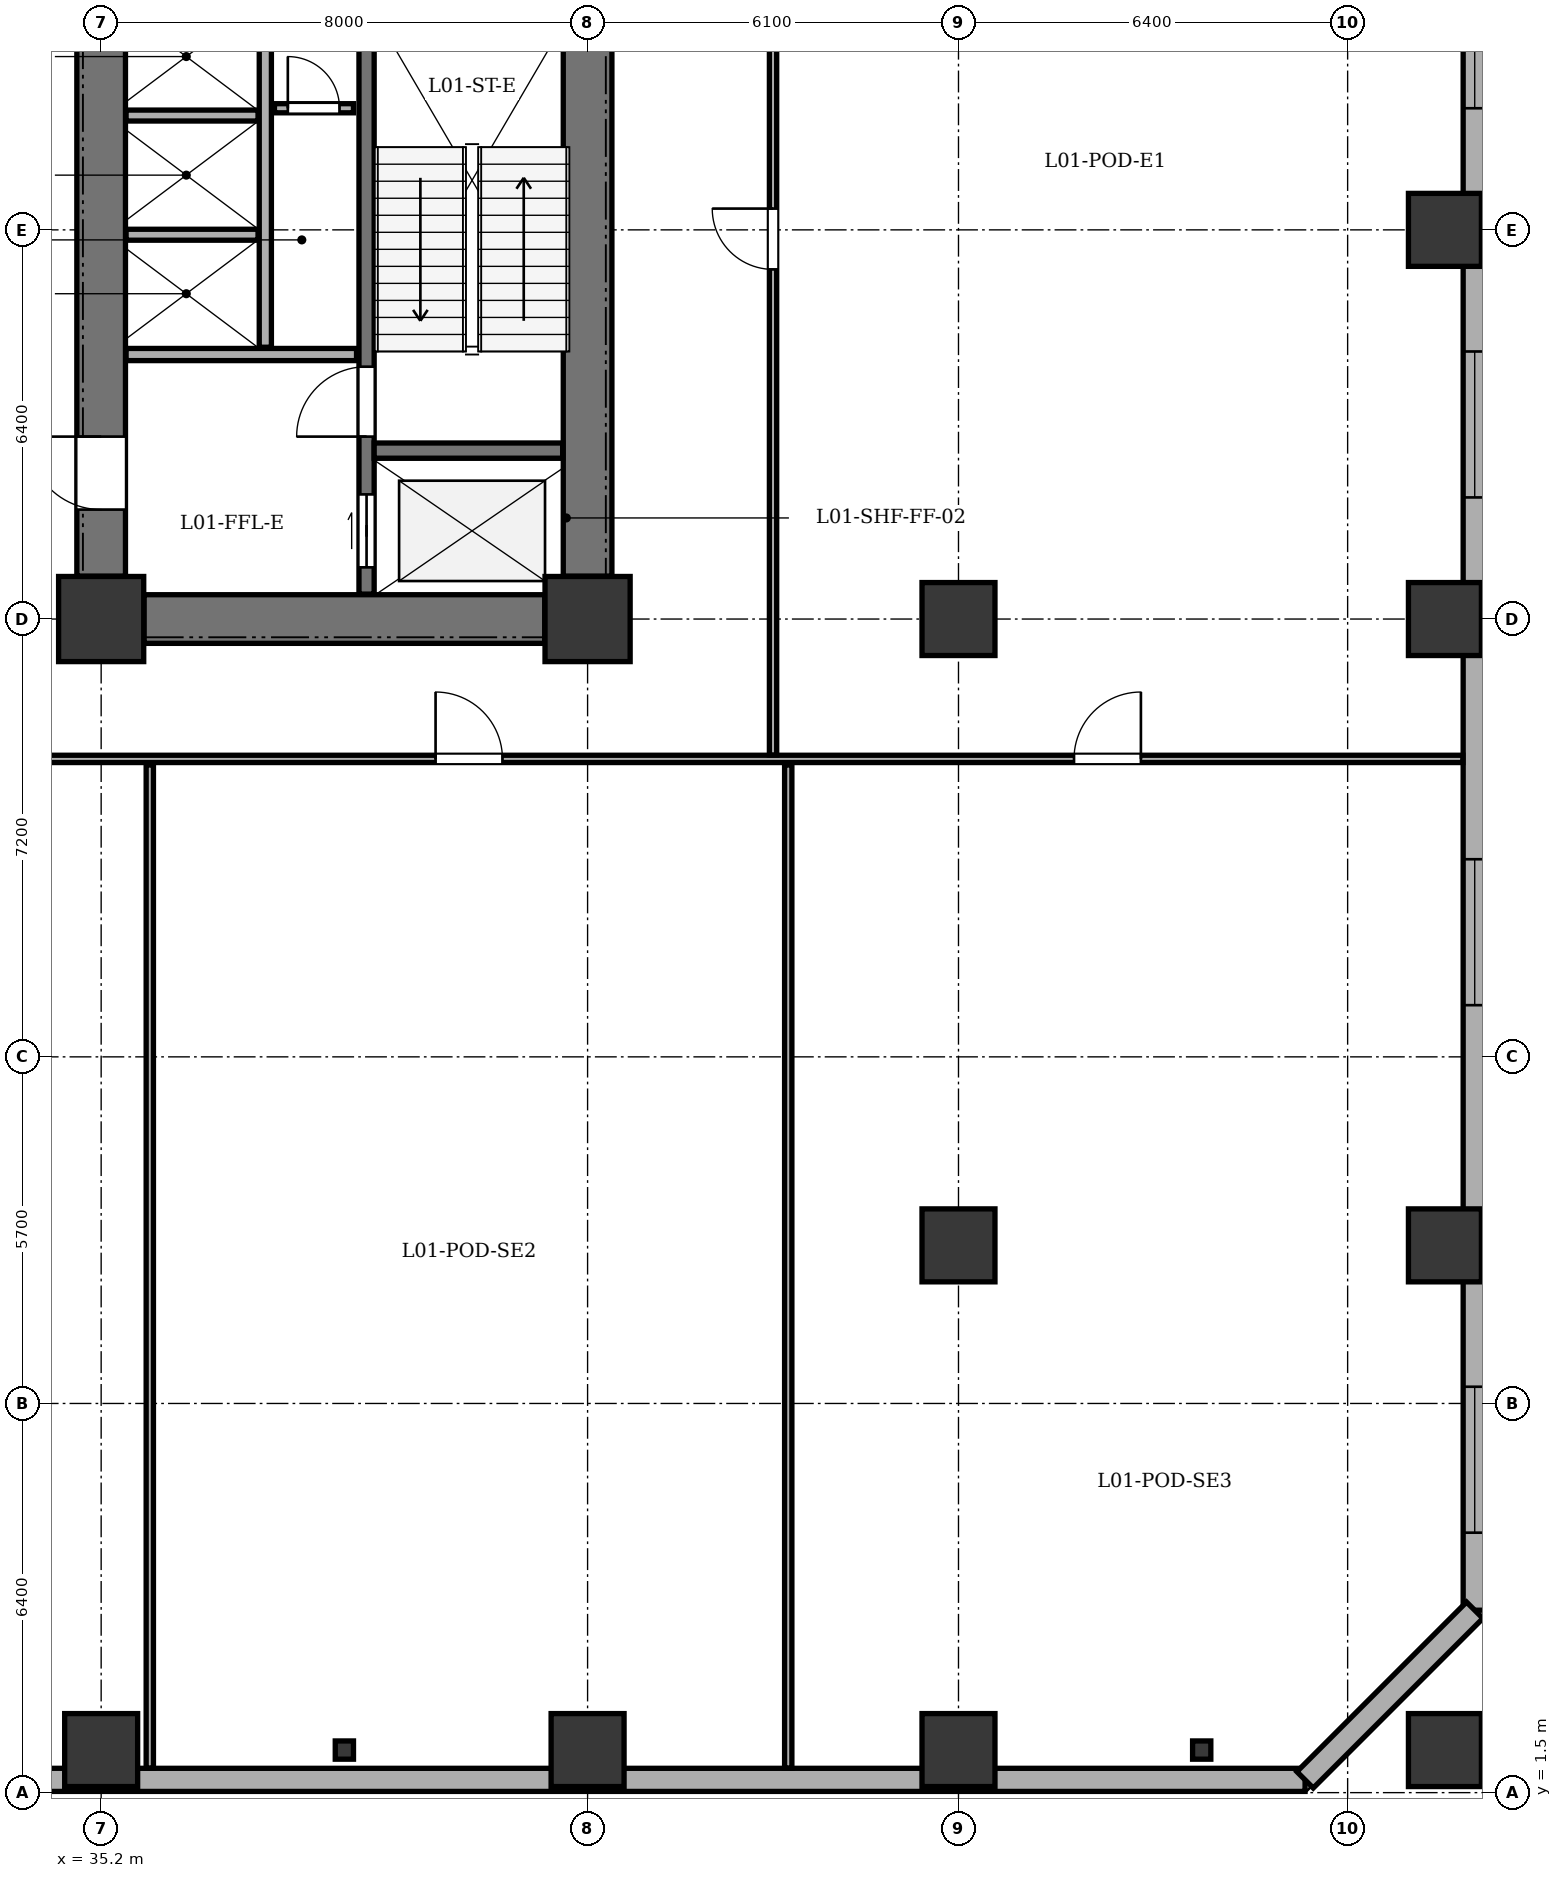
"""IFC4 building model, lengths in metres.
Left out: names, types, materials, properties, quantities, classifications, styles, units other than length and angle.
Written with IfcOpenShell. Run it as: python <this file> out.ifc"""

import sys

from ifc_helpers import new_model, si_unit, direction, frame, frame_2d, origin, origin_2d, place, context, subcontext, project, spatial, rectangle, i_section, extrude, element, fill, save


model = new_model("IFC4")
c1 = context("Model", 3, precision=1e-05, world=origin(), true_north=direction((0.0, 1.0)))
c2 = subcontext(c1, "Body", "Model", "MODEL_VIEW")
j1 = project(units=[si_unit("LENGTHUNIT", "METRE"), si_unit("PLANEANGLEUNIT", "RADIAN")], contexts=[c1])
p1 = place(None, origin())
s1 = spatial("IfcSite", under=j1, at=p1, CompositionType="ELEMENT")
p2 = place(p1, origin())
s2 = spatial("IfcBuilding", under=s1, at=p2, CompositionType="ELEMENT")
p3 = place(p2, frame((0.0, 0.0, 5.4)))
s3 = spatial("IfcBuildingStorey", under=s2, at=p3, CompositionType="ELEMENT", Elevation=5.4)
for number, where, z_axis, x_axis in (
    (1, (35.2, 20.8, 0.0), (0.0, 0.0, 1.0), (1.0, 0.0, 0.0)),
    (2, (43.2, 20.8, 0.0), (0.0, 0.0, 1.0), (1.0, 0.0, 0.0)),
):
    element("IfcColumn", number, at=place(p3, frame(where, z_axis=z_axis, x_axis=x_axis)), inside=s3, PredefinedType="COLUMN", context=c2, shape_type="SweptSolid", body=[
        extrude(rectangle(XDim=1.4, YDim=1.4, at=origin_2d()), origin(), (0.0, 0.0, 1.0), 4.5),
    ])
for number, where, z_axis, x_axis in (
    (3, (35.2, 2.2, 0.0), (0.0, 0.0, 1.0), (1.0, 0.0, 0.0)),
    (4, (43.2, 2.2, 0.0), (0.0, 0.0, 1.0), (1.0, 0.0, 0.0)),
    (5, (49.3, 2.2, 0.0), (0.0, 0.0, 1.0), (1.0, 0.0, 0.0)),
    (6, (57.3, 2.2, 0.0), (0.0, 0.0, 1.0), (1.0, 0.0, 0.0)),
    (7, (57.3, 10.5, 0.0), (0.0, 0.0, 1.0), (1.0, 0.0, 0.0)),
    (8, (57.3, 20.8, 0.0), (0.0, 0.0, 1.0), (1.0, 0.0, 0.0)),
    (9, (57.3, 27.2, 0.0), (0.0, 0.0, 1.0), (1.0, 0.0, 0.0)),
    (10, (49.3, 10.5, 0.0), (0.0, 0.0, 1.0), (1.0, 0.0, 0.0)),
    (11, (49.3, 20.8, 0.0), (0.0, 0.0, 1.0), (1.0, 0.0, 0.0)),
):
    element("IfcColumn", number, at=place(p3, frame(where, z_axis=z_axis, x_axis=x_axis)), inside=s3, PredefinedType="COLUMN", context=c2, shape_type="SweptSolid", body=[
        extrude(rectangle(XDim=1.2, YDim=1.2, at=origin_2d()), origin(), (0.0, 0.0, 1.0), 4.5),
    ])
for number, where, z_axis, x_axis in (
    (12, (39.2, 2.2, 0.0), (0.0, 0.0, 1.0), (1.0, 0.0, 0.0)),
    (13, (53.3, 2.2, 0.0), (0.0, 0.0, 1.0), (1.0, 0.0, 0.0)),
):
    element("IfcColumn", number, at=place(p3, frame(where, z_axis=z_axis, x_axis=x_axis)), inside=s3, PredefinedType="PILASTER", context=c2, shape_type="SweptSolid", body=[
        extrude(i_section(OverallWidth=0.3, OverallDepth=0.3, WebThickness=0.011, FlangeThickness=0.019, at=origin_2d()), origin(), (0.0, 0.0, 1.0), 4.18),
    ])
p4 = place(p3, frame((55.0, 1.71, 0.0), z_axis=(0.0, 0.0, 1.0), x_axis=(-1.0, 0.0, 0.0)))
e14 = element("IfcWall", 14, at=p4, inside=s3, PredefinedType="STANDARD", context=c2, shape_type="SweptSolid", body=[
    extrude(rectangle(XDim=49.6, YDim=0.38, at=frame_2d((24.8, 0.0))), origin(), (0.0, 0.0, 1.0), 4.18),
])
p5 = place(p3, frame((57.79, 49.9, 0.0), z_axis=(0.0, 0.0, 1.0), x_axis=(0.0, -1.0, 0.0)))
e15 = element("IfcWall", 15, at=p5, inside=s3, PredefinedType="STANDARD", context=c2, shape_type="SweptSolid", body=[
    extrude(rectangle(XDim=45.4, YDim=0.38, at=frame_2d((22.7, 0.0))), origin(), (0.0, 0.0, 1.0), 4.18),
])
p6 = place(p5, frame((1.275, 0.0, 0.75)))
e16 = element("IfcOpeningElement", 16, at=p6, cuts=e15, PredefinedType="OPENING", context=c2, shape_type="SweptSolid", body=[
    extrude(rectangle(XDim=2.4, YDim=2.1, at=frame_2d((1.2, 1.05))), frame((0.0, 0.2, 0.0), z_axis=(0.0, -1.0, 0.0), x_axis=(1.0, 0.0, 0.0)), (0.0, 0.0, 1.0), 0.4),
])
p7 = place(p5, frame((9.95, 0.0, 0.75)))
e17 = element("IfcOpeningElement", 17, at=p7, cuts=e15, PredefinedType="OPENING", context=c2, shape_type="SweptSolid", body=[
    extrude(rectangle(XDim=2.4, YDim=2.1, at=frame_2d((1.2, 1.05))), frame((0.0, 0.2, 0.0), z_axis=(0.0, -1.0, 0.0), x_axis=(1.0, 0.0, 0.0)), (0.0, 0.0, 1.0), 0.4),
])
p8 = place(p5, frame((18.3, 0.0, 0.75)))
e18 = element("IfcOpeningElement", 18, at=p8, cuts=e15, PredefinedType="OPENING", context=c2, shape_type="SweptSolid", body=[
    extrude(rectangle(XDim=2.4, YDim=2.1, at=frame_2d((1.2, 1.05))), frame((0.0, 0.2, 0.0), z_axis=(0.0, -1.0, 0.0), x_axis=(1.0, 0.0, 0.0)), (0.0, 0.0, 1.0), 0.4),
])
p9 = place(p5, frame((24.7, 0.0, 0.75)))
e19 = element("IfcOpeningElement", 19, at=p9, cuts=e15, PredefinedType="OPENING", context=c2, shape_type="SweptSolid", body=[
    extrude(rectangle(XDim=2.4, YDim=2.1, at=frame_2d((1.2, 1.05))), frame((0.0, 0.2, 0.0), z_axis=(0.0, -1.0, 0.0), x_axis=(1.0, 0.0, 0.0)), (0.0, 0.0, 1.0), 0.4),
])
p10 = place(p5, frame((33.05, 0.0, 0.75)))
e20 = element("IfcOpeningElement", 20, at=p10, cuts=e15, PredefinedType="OPENING", context=c2, shape_type="SweptSolid", body=[
    extrude(rectangle(XDim=2.4, YDim=2.1, at=frame_2d((1.2, 1.05))), frame((0.0, 0.2, 0.0), z_axis=(0.0, -1.0, 0.0), x_axis=(1.0, 0.0, 0.0)), (0.0, 0.0, 1.0), 0.4),
])
p11 = place(p5, frame((41.725, 0.0, 0.75)))
e21 = element("IfcOpeningElement", 21, at=p11, cuts=e15, PredefinedType="OPENING", context=c2, shape_type="SweptSolid", body=[
    extrude(rectangle(XDim=2.4, YDim=2.1, at=frame_2d((1.2, 1.05))), frame((0.0, 0.2, 0.0), z_axis=(0.0, -1.0, 0.0), x_axis=(1.0, 0.0, 0.0)), (0.0, 0.0, 1.0), 0.4),
])
p12 = place(p3, frame((57.79, 4.5, 0.0), z_axis=(0.0, 0.0, 1.0), x_axis=(-0.707106781187, -0.707106781187, 0.0)))
e22 = element("IfcWall", 22, at=p12, inside=s3, PredefinedType="STANDARD", context=c2, shape_type="SweptSolid", body=[
    extrude(rectangle(XDim=3.946, YDim=0.38, at=frame_2d((1.973, 0.0))), origin(), (0.0, 0.0, 1.0), 4.18),
])
p13 = place(p3, frame((43.2, 21.505, 0.0), z_axis=(0.0, 0.0, 1.0), x_axis=(0.0, 1.0, 0.0)))
e23 = element("IfcWall", 23, at=p13, inside=s3, PredefinedType="SHEAR", context=c2, shape_type="SweptSolid", body=[
    extrude(rectangle(XDim=11.39, YDim=0.8, at=frame_2d((5.695, 0.0))), origin(), (0.0, 0.0, 1.0), 4.18),
])
p14 = place(p3, frame((35.905, 20.8, 0.0), z_axis=(0.0, 0.0, 1.0), x_axis=(1.0, 0.0, 0.0)))
e24 = element("IfcWall", 24, at=p14, inside=s3, PredefinedType="SHEAR", context=c2, shape_type="SweptSolid", body=[
    extrude(rectangle(XDim=6.59, YDim=0.8, at=frame_2d((3.295, 0.0))), origin(), (0.0, 0.0, 1.0), 4.18),
])
p15 = place(p3, frame((35.2, 21.505, 0.0), z_axis=(0.0, 0.0, 1.0), x_axis=(0.0, 1.0, 0.0)))
e25 = element("IfcWall", 25, at=p15, inside=s3, PredefinedType="SHEAR", context=c2, shape_type="SweptSolid", body=[
    extrude(rectangle(XDim=11.39, YDim=0.8, at=frame_2d((5.695, 0.0))), origin(), (0.0, 0.0, 1.0), 4.18),
])
p16 = place(p15, frame((1.095, 0.0, 0.0)))
e26 = element("IfcOpeningElement", 26, at=p16, cuts=e25, PredefinedType="OPENING", context=c2, shape_type="SweptSolid", body=[
    extrude(rectangle(XDim=1.2, YDim=2.15, at=frame_2d((0.6, 1.075))), frame((0.0, 0.41, 0.0), z_axis=(0.0, -1.0, 0.0), x_axis=(1.0, 0.0, 0.0)), (0.0, 0.0, 1.0), 0.82),
])
p17 = place(p15, frame((10.195, 0.0, 0.0)))
e27 = element("IfcOpeningElement", 27, at=p17, cuts=e25, PredefinedType="OPENING", context=c2, shape_type="SweptSolid", body=[
    extrude(rectangle(XDim=1.1, YDim=2.1, at=frame_2d((0.55, 1.05))), frame((0.0, 0.41, 0.0), z_axis=(0.0, -1.0, 0.0), x_axis=(1.0, 0.0, 0.0)), (0.0, 0.0, 1.0), 0.82),
])
p18 = place(p3, frame((39.565, 21.21, 0.0), z_axis=(0.0, 0.0, 1.0), x_axis=(0.0, 1.0, 0.0)))
e28 = element("IfcWall", 28, at=p18, inside=s3, PredefinedType="SHEAR", context=c2, shape_type="SweptSolid", body=[
    extrude(rectangle(XDim=11.98, YDim=0.25, at=frame_2d((5.99, 0.0))), origin(), (0.0, 0.0, 1.0), 4.18),
])
p19 = place(p18, frame((0.44, 0.0, 0.0)))
e29 = element("IfcOpeningElement", 29, at=p19, cuts=e28, PredefinedType="OPENING", context=c2, shape_type="SweptSolid", body=[
    extrude(rectangle(XDim=1.2, YDim=2.15, at=frame_2d((0.6, 1.075))), frame((0.0, 0.135, 0.0), z_axis=(0.0, -1.0, 0.0), x_axis=(1.0, 0.0, 0.0)), (0.0, 0.0, 1.0), 0.27),
])
p20 = place(p18, frame((2.59, 0.0, 0.0)))
e30 = element("IfcOpeningElement", 30, at=p20, cuts=e28, PredefinedType="OPENING", context=c2, shape_type="SweptSolid", body=[
    extrude(rectangle(XDim=1.15, YDim=2.15, at=frame_2d((0.575, 1.075))), frame((0.0, 0.135, 0.0), z_axis=(0.0, -1.0, 0.0), x_axis=(1.0, 0.0, 0.0)), (0.0, 0.0, 1.0), 0.27),
])
p21 = place(p3, frame((39.69, 23.57, 0.0), z_axis=(0.0, 0.0, 1.0), x_axis=(1.0, 0.0, 0.0)))
e31 = element("IfcWall", 31, at=p21, inside=s3, PredefinedType="SHEAR", context=c2, shape_type="SweptSolid", body=[
    extrude(rectangle(XDim=3.1, YDim=0.25, at=frame_2d((1.55, 0.0))), origin(), (0.0, 0.0, 1.0), 4.18),
])
p22 = place(p3, frame((35.61, 25.15, 0.0), z_axis=(0.0, 0.0, 1.0), x_axis=(1.0, 0.0, 0.0)))
e32 = element("IfcWall", 32, at=p22, inside=s3, PredefinedType="SOLIDWALL", context=c2, shape_type="SweptSolid", body=[
    extrude(rectangle(XDim=3.79, YDim=0.2, at=frame_2d((1.895, 0.0))), origin(), (0.0, 0.0, 1.0), 4.18),
])
p23 = place(p3, frame((37.9, 25.27, 0.0), z_axis=(0.0, 0.0, 1.0), x_axis=(0.0, 1.0, 0.0)))
e33 = element("IfcWall", 33, at=p23, inside=s3, PredefinedType="SOLIDWALL", context=c2, shape_type="SweptSolid", body=[
    extrude(rectangle(XDim=7.92, YDim=0.2, at=frame_2d((3.96, 0.0))), origin(), (0.0, 0.0, 1.0), 4.18),
])
for number, where, z_axis, x_axis in (
    (34, (35.61, 27.12, 0.0), (0.0, 0.0, 1.0), (1.0, 0.0, 0.0)),
    (35, (35.61, 29.08, 0.0), (0.0, 0.0, 1.0), (1.0, 0.0, 0.0)),
):
    element("IfcWall", number, at=place(p3, frame(where, z_axis=z_axis, x_axis=x_axis)), inside=s3, PredefinedType="PARTITIONING", context=c2, shape_type="SweptSolid", body=[
        extrude(rectangle(XDim=2.17, YDim=0.18, at=frame_2d((1.085, 0.0))), origin(), (0.0, 0.0, 1.0), 4.18),
    ])
p24 = place(p3, frame((38.05, 29.2, 0.0), z_axis=(0.0, 0.0, 1.0), x_axis=(1.0, 0.0, 0.0)))
e36 = element("IfcWall", 36, at=p24, inside=s3, PredefinedType="PARTITIONING", context=c2, shape_type="SweptSolid", body=[
    extrude(rectangle(XDim=1.3, YDim=0.15, at=frame_2d((0.65, 0.0))), origin(), (0.0, 0.0, 1.0), 4.18),
])
p25 = place(p24, frame((0.22, 0.0, 0.0)))
e37 = element("IfcOpeningElement", 37, at=p25, cuts=e36, PredefinedType="OPENING", context=c2, shape_type="SweptSolid", body=[
    extrude(rectangle(XDim=0.85, YDim=2.02, at=frame_2d((0.425, 1.01))), frame((0.0, 0.085, 0.0), z_axis=(0.0, -1.0, 0.0), x_axis=(1.0, 0.0, 0.0)), (0.0, 0.0, 1.0), 0.17),
])
p26 = place(p3, frame((26.015, 18.5, 0.0), z_axis=(0.0, 0.0, 1.0), x_axis=(1.0, 0.0, 0.0)))
e38 = element("IfcWall", 38, at=p26, inside=s3, PredefinedType="PARTITIONING", context=c2, shape_type="SweptSolid", body=[
    extrude(rectangle(XDim=31.58, YDim=0.12, at=frame_2d((15.79, 0.0))), origin(), (0.0, 0.0, 1.0), 3.665),
])
p27 = place(p26, frame((4.36, 0.0, 0.0)))
e39 = element("IfcOpeningElement", 39, at=p27, cuts=e38, PredefinedType="OPENING", context=c2, shape_type="SweptSolid", body=[
    extrude(rectangle(XDim=1.1, YDim=2.15, at=frame_2d((0.55, 1.075))), frame((0.0, 0.07, 0.0), z_axis=(0.0, -1.0, 0.0), x_axis=(1.0, 0.0, 0.0)), (0.0, 0.0, 1.0), 0.14),
])
p28 = place(p26, frame((14.685, 0.0, 0.0)))
e40 = element("IfcOpeningElement", 40, at=p28, cuts=e38, PredefinedType="OPENING", context=c2, shape_type="SweptSolid", body=[
    extrude(rectangle(XDim=1.1, YDim=2.15, at=frame_2d((0.55, 1.075))), frame((0.0, 0.07, 0.0), z_axis=(0.0, -1.0, 0.0), x_axis=(1.0, 0.0, 0.0)), (0.0, 0.0, 1.0), 0.14),
])
p29 = place(p26, frame((25.185, 0.0, 0.0)))
e41 = element("IfcOpeningElement", 41, at=p29, cuts=e38, PredefinedType="OPENING", context=c2, shape_type="SweptSolid", body=[
    extrude(rectangle(XDim=1.1, YDim=2.15, at=frame_2d((0.55, 1.075))), frame((0.0, 0.07, 0.0), z_axis=(0.0, -1.0, 0.0), x_axis=(1.0, 0.0, 0.0)), (0.0, 0.0, 1.0), 0.14),
])
for number, where, z_axis, x_axis in (
    (42, (36.0, 1.905, 0.0), (0.0, 0.0, 1.0), (0.0, 1.0, 0.0)),
    (43, (46.5, 1.905, 0.0), (0.0, 0.0, 1.0), (0.0, 1.0, 0.0)),
):
    element("IfcWall", number, at=place(p3, frame(where, z_axis=z_axis, x_axis=x_axis)), inside=s3, PredefinedType="PARTITIONING", context=c2, shape_type="SweptSolid", body=[
        extrude(rectangle(XDim=16.495, YDim=0.12, at=frame_2d((8.248, 0.0))), origin(), (0.0, 0.0, 1.0), 4.18),
    ])
p30 = place(p3, frame((46.25, 18.565, 0.0), z_axis=(0.0, 0.0, 1.0), x_axis=(0.0, 1.0, 0.0)))
e44 = element("IfcWall", 44, at=p30, inside=s3, PredefinedType="PARTITIONING", context=c2, shape_type="SweptSolid", body=[
    extrude(rectangle(XDim=19.72, YDim=0.12, at=frame_2d((9.86, 0.0))), origin(), (0.0, 0.0, 1.0), 4.18),
])
p31 = place(p30, frame((7.985, 0.0, 0.0)))
e45 = element("IfcOpeningElement", 45, at=p31, cuts=e44, PredefinedType="OPENING", context=c2, shape_type="SweptSolid", body=[
    extrude(rectangle(XDim=1.0, YDim=2.1, at=frame_2d((0.5, 1.05))), frame((0.0, 0.07, 0.0), z_axis=(0.0, -1.0, 0.0), x_axis=(1.0, 0.0, 0.0)), (0.0, 0.0, 1.0), 0.14),
])
p32 = place(p8, origin())
e46 = element("IfcWindow", 46, at=p32, inside=s3, PartitioningType="SINGLE_PANEL", PredefinedType="WINDOW", context=c2, shape_type="SweptSolid", body=[
    extrude(rectangle(XDim=2.4, YDim=2.1, at=frame_2d((1.2, 1.05))), frame((0.0, 0.03, 0.0), z_axis=(0.0, -1.0, 0.0), x_axis=(1.0, 0.0, 0.0)), (0.0, 0.0, 1.0), 0.06),
])
fill(e18, e46)
p33 = place(p9, origin())
e47 = element("IfcWindow", 47, at=p33, inside=s3, PartitioningType="SINGLE_PANEL", PredefinedType="WINDOW", context=c2, shape_type="SweptSolid", body=[
    extrude(rectangle(XDim=2.4, YDim=2.1, at=frame_2d((1.2, 1.05))), frame((0.0, 0.03, 0.0), z_axis=(0.0, -1.0, 0.0), x_axis=(1.0, 0.0, 0.0)), (0.0, 0.0, 1.0), 0.06),
])
fill(e19, e47)
p34 = place(p10, origin())
e48 = element("IfcWindow", 48, at=p34, inside=s3, PartitioningType="SINGLE_PANEL", PredefinedType="WINDOW", context=c2, shape_type="SweptSolid", body=[
    extrude(rectangle(XDim=2.4, YDim=2.1, at=frame_2d((1.2, 1.05))), frame((0.0, 0.03, 0.0), z_axis=(0.0, -1.0, 0.0), x_axis=(1.0, 0.0, 0.0)), (0.0, 0.0, 1.0), 0.06),
])
fill(e20, e48)
p35 = place(p11, origin())
e49 = element("IfcWindow", 49, at=p35, inside=s3, PartitioningType="SINGLE_PANEL", PredefinedType="WINDOW", context=c2, shape_type="SweptSolid", body=[
    extrude(rectangle(XDim=2.4, YDim=2.1, at=frame_2d((1.2, 1.05))), frame((0.0, 0.03, 0.0), z_axis=(0.0, -1.0, 0.0), x_axis=(1.0, 0.0, 0.0)), (0.0, 0.0, 1.0), 0.06),
])
fill(e21, e49)
p36 = place(p16, origin())
e50 = element("IfcDoor", 50, at=p36, inside=s3, OperationType="SINGLE_SWING_RIGHT", PredefinedType="DOOR", context=c2, shape_type="SweptSolid", body=[
    extrude(rectangle(XDim=1.2, YDim=2.15, at=frame_2d((0.6, 1.075))), frame((0.0, 0.025, 0.0), z_axis=(0.0, -1.0, 0.0), x_axis=(1.0, 0.0, 0.0)), (0.0, 0.0, 1.0), 0.05),
])
fill(e26, e50)
p37 = place(p19, origin())
e51 = element("IfcDoor", 51, at=p37, inside=s3, OperationType="DOUBLE_DOOR_SLIDING", PredefinedType="DOOR", context=c2, shape_type="SweptSolid", body=[
    extrude(rectangle(XDim=1.2, YDim=2.15, at=frame_2d((0.6, 1.075))), frame((0.0, 0.025, 0.0), z_axis=(0.0, -1.0, 0.0), x_axis=(1.0, 0.0, 0.0)), (0.0, 0.0, 1.0), 0.05),
])
fill(e29, e51)
p38 = place(p20, origin())
e52 = element("IfcDoor", 52, at=p38, inside=s3, OperationType="SINGLE_SWING_LEFT", PredefinedType="DOOR", context=c2, shape_type="SweptSolid", body=[
    extrude(rectangle(XDim=1.15, YDim=2.15, at=frame_2d((0.575, 1.075))), frame((0.0, 0.025, 0.0), z_axis=(0.0, -1.0, 0.0), x_axis=(1.0, 0.0, 0.0)), (0.0, 0.0, 1.0), 0.05),
])
fill(e30, e52)
p39 = place(p25, origin())
e53 = element("IfcDoor", 53, at=p39, inside=s3, OperationType="SINGLE_SWING_LEFT", PredefinedType="DOOR", context=c2, shape_type="SweptSolid", body=[
    extrude(rectangle(XDim=0.85, YDim=2.02, at=frame_2d((0.425, 1.01))), frame((0.0, 0.025, 0.0), z_axis=(0.0, -1.0, 0.0), x_axis=(1.0, 0.0, 0.0)), (0.0, 0.0, 1.0), 0.05),
])
fill(e37, e53)
p40 = place(p28, origin())
e54 = element("IfcDoor", 54, at=p40, inside=s3, OperationType="SINGLE_SWING_LEFT", PredefinedType="DOOR", context=c2, shape_type="SweptSolid", body=[
    extrude(rectangle(XDim=1.1, YDim=2.15, at=frame_2d((0.55, 1.075))), frame((0.0, 0.025, 0.0), z_axis=(0.0, -1.0, 0.0), x_axis=(1.0, 0.0, 0.0)), (0.0, 0.0, 1.0), 0.05),
])
fill(e40, e54)
p41 = place(p29, origin())
e55 = element("IfcDoor", 55, at=p41, inside=s3, OperationType="SINGLE_SWING_RIGHT", PredefinedType="DOOR", context=c2, shape_type="SweptSolid", body=[
    extrude(rectangle(XDim=1.1, YDim=2.15, at=frame_2d((0.55, 1.075))), frame((0.0, 0.025, 0.0), z_axis=(0.0, -1.0, 0.0), x_axis=(1.0, 0.0, 0.0)), (0.0, 0.0, 1.0), 0.05),
])
fill(e41, e55)
p42 = place(p31, origin())
e56 = element("IfcDoor", 56, at=p42, inside=s3, OperationType="SINGLE_SWING_RIGHT", PredefinedType="DOOR", context=c2, shape_type="SweptSolid", body=[
    extrude(rectangle(XDim=1.0, YDim=2.1, at=frame_2d((0.5, 1.05))), frame((0.0, 0.025, 0.0), z_axis=(0.0, -1.0, 0.0), x_axis=(1.0, 0.0, 0.0)), (0.0, 0.0, 1.0), 0.05),
])
fill(e45, e56)
save(model, sys.argv[1])
